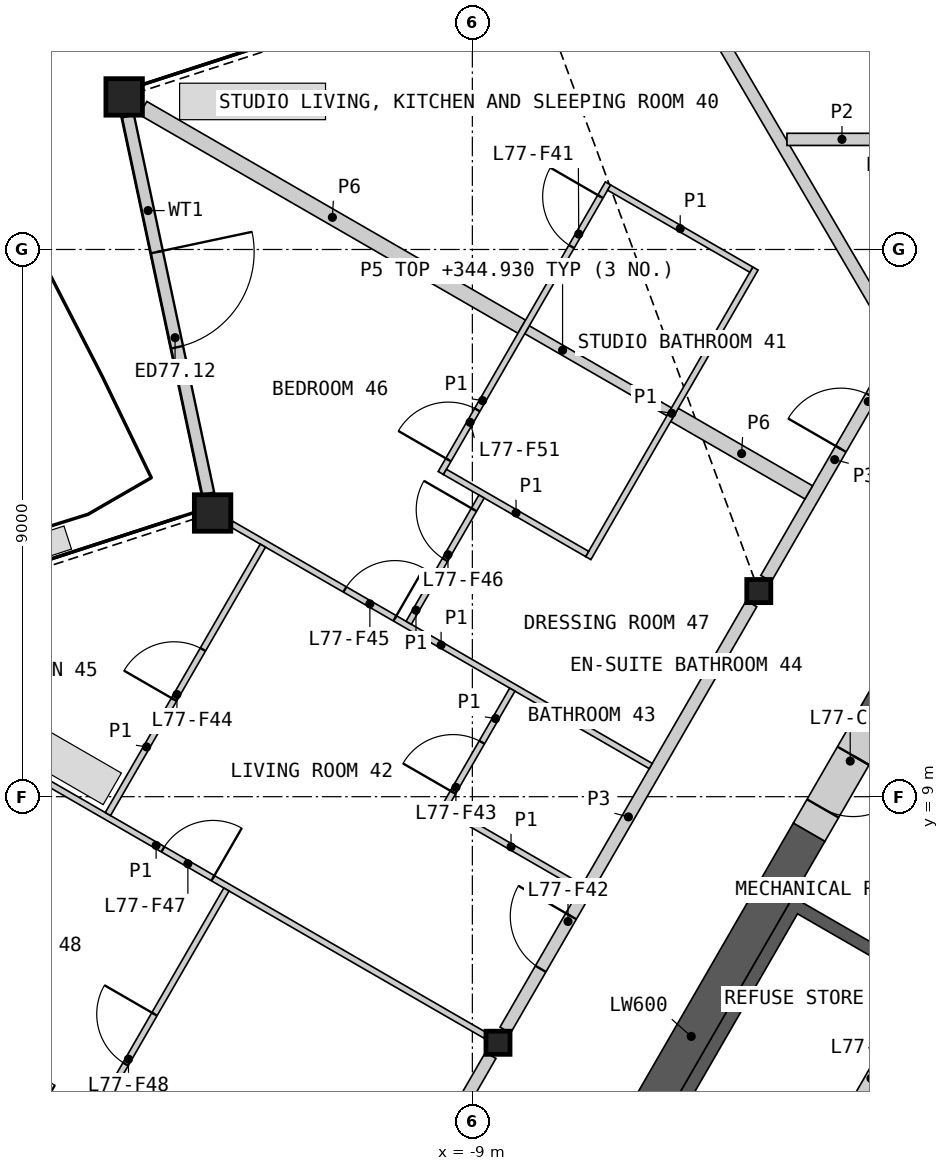
"""IFC4 building model, lengths in metres.
Left out: names, types, materials, properties, quantities, classifications, styles, units other than length and angle.
Written with IfcOpenShell. Run it as: python <this file> out.ifc"""

import sys

from ifc_helpers import new_model, si_unit, direction, frame, frame_2d, origin, origin_2d, place, context, subcontext, project, spatial, polyline, rectangle, hollow_rectangle, i_section, outline, extrude, element, fill, save


model = new_model("IFC4")
c1 = context("Model", 3, precision=1e-05, world=origin(), true_north=direction((0.0, 1.0)))
c2 = subcontext(c1, "Body", "Model", "MODEL_VIEW")
j1 = project(units=[si_unit("LENGTHUNIT", "METRE"), si_unit("PLANEANGLEUNIT", "RADIAN")], contexts=[c1])
p1 = place(None, origin())
s1 = spatial("IfcSite", under=j1, at=p1, CompositionType="ELEMENT")
p2 = place(p1, origin())
s2 = spatial("IfcBuilding", under=s1, at=p2, CompositionType="ELEMENT")
p3 = place(p2, frame((0.0, 0.0, 342.6)))
s3 = spatial("IfcBuildingStorey", under=s2, at=p3, CompositionType="ELEMENT", Elevation=342.6)
for number, where, z_axis, x_axis in (
    (1, (-14.727, 20.509, 0.0), (0.0, 0.0, 1.0), (1.0, 0.0, 0.0)),
    (2, (-13.272, 13.666, 0.0), (0.0, 0.0, 1.0), (1.0, 0.0, 0.0)),
):
    element("IfcColumn", number, at=place(p3, frame(where, z_axis=z_axis, x_axis=x_axis)), inside=s3, PredefinedType="COLUMN", context=c2, shape_type="SweptSolid", body=[
        extrude(hollow_rectangle(XDim=0.6, YDim=0.6, WallThickness=0.04, at=origin_2d()), origin(), (0.0, 0.0, 1.0), 3.4),
    ])
for number, where, z_axis, x_axis in (
    (3, (-4.289, 12.382, 0.0), (0.0, 0.0, 1.0), (1.0, 0.0, 0.0)),
    (4, (-8.578, 4.953, 0.0), (0.0, 0.0, 1.0), (1.0, 0.0, 0.0)),
):
    element("IfcColumn", number, at=place(p3, frame(where, z_axis=z_axis, x_axis=x_axis)), inside=s3, PredefinedType="COLUMN", context=c2, shape_type="SweptSolid", body=[
        extrude(i_section(OverallWidth=0.396, OverallDepth=0.381, WebThickness=0.019, FlangeThickness=0.03, at=origin_2d()), origin(), (0.0, 0.0, 1.0), 3.4),
    ])
p4 = place(p3, frame((-14.663, 20.192, 0.0), z_axis=(0.0, 0.0, 1.0), x_axis=(0.207897850695, -0.97815054244, 0.0)))
e5 = element("IfcWall", 5, at=p4, inside=s3, PredefinedType="SOLIDWALL", context=c2, shape_type="SweptSolid", body=[
    extrude(rectangle(XDim=6.348, YDim=0.2, at=frame_2d((3.174, 0.0))), origin(), (0.0, 0.0, 1.0), 2.488),
])
p5 = place(p4, frame((2.285, 0.0, 0.0)))
e6 = element("IfcOpeningElement", 6, at=p5, cuts=e5, PredefinedType="OPENING", context=c2, shape_type="SweptSolid", body=[
    extrude(rectangle(XDim=1.6, YDim=2.25, at=frame_2d((0.8, 1.125))), frame((0.0, 0.11, 0.0), z_axis=(0.0, -1.0, 0.0), x_axis=(1.0, 0.0, 0.0)), (0.0, 0.0, 1.0), 0.22),
])
p6 = place(p3, origin())
e7 = element("IfcWall", 7, at=p6, inside=s3, PredefinedType="SHEAR", context=c2, shape_type="SweptSolid", body=[
    extrude(outline(polyline([(-4.96, 0.208), (-7.131, 1.461), (-3.731, 7.35), (-1.561, 6.097), (-1.66, 5.924), (-3.652, 7.074), (-5.752, 3.437), (-3.76, 2.287), (-3.861, 2.113), (-5.852, 3.263), (-6.852, 1.531), (-4.861, 0.381), (-4.96, 0.208)])), origin(), (0.0, 0.0, 1.0), 3.1),
])
p7 = place(p3, frame((-1.631, 5.776, 0.0), z_axis=(0.0, 0.0, 1.0), x_axis=(-0.499992876559, -0.866029516466, 0.0)))
e8 = element("IfcWall", 8, at=p7, inside=s3, PredefinedType="SOLIDWALL", context=c2, shape_type="SweptSolid", body=[
    extrude(rectangle(XDim=6.486, YDim=0.2, at=frame_2d((3.243, 0.0))), origin(), (0.0, 0.0, 1.0), 3.1),
])
p8 = place(p7, frame((1.537, 0.0, 0.0)))
e9 = element("IfcOpeningElement", 9, at=p8, cuts=e8, PredefinedType="OPENING", context=c2, shape_type="SweptSolid", body=[
    extrude(rectangle(XDim=0.9, YDim=2.1, at=frame_2d((0.45, 1.05))), frame((0.0, 0.11, 0.0), z_axis=(0.0, -1.0, 0.0), x_axis=(1.0, 0.0, 0.0)), (0.0, 0.0, 1.0), 0.22),
])
p9 = place(p7, frame((4.837, 0.0, 0.0)))
e10 = element("IfcOpeningElement", 10, at=p9, cuts=e8, PredefinedType="OPENING", context=c2, shape_type="SweptSolid", body=[
    extrude(rectangle(XDim=0.9, YDim=2.1, at=frame_2d((0.45, 1.05))), frame((0.0, 0.11, 0.0), z_axis=(0.0, -1.0, 0.0), x_axis=(1.0, 0.0, 0.0)), (0.0, 0.0, 1.0), 0.22),
])
p10 = place(p3, frame((-3.461, 8.417, 0.0), z_axis=(0.0, 0.0, 1.0), x_axis=(-0.50000391502, -0.866023143435, 0.0)))
e11 = element("IfcWall", 11, at=p10, inside=s3, PredefinedType="SHEAR", context=c2, shape_type="SweptSolid", body=[
    extrude(rectangle(XDim=7.759, YDim=0.6, at=frame_2d((3.879, 0.0))), origin(), (0.0, 0.0, 1.0), 3.1),
])
p11 = place(p3, frame((-1.59, 11.658, 0.0), z_axis=(0.0, 0.0, 1.0), x_axis=(-0.500037594623, -0.866003697431, 0.0)))
e12 = element("IfcWall", 12, at=p11, inside=s3, PredefinedType="SHEAR", context=c2, shape_type="SweptSolid", body=[
    extrude(rectangle(XDim=1.542, YDim=0.6, at=frame_2d((0.771, 0.0))), origin(), (0.0, 0.0, 1.0), 3.1),
])
p12 = place(p3, frame((-2.361, 10.322, 0.0), z_axis=(0.0, 0.0, 1.0), x_axis=(-0.499946605688, -0.86605622881, 0.0)))
e13 = element("IfcWall", 13, at=p12, inside=s3, PredefinedType="SHEAR", context=c2, shape_type="SweptSolid", body=[
    extrude(rectangle(XDim=2.2, YDim=0.6, at=frame_2d((1.1, 0.0))), origin(), (0.0, 0.0, 1.0), 3.1),
])
p13 = place(p12, frame((0.75, 0.0, 0.0)))
e14 = element("IfcOpeningElement", 14, at=p13, cuts=e13, PredefinedType="OPENING", context=c2, shape_type="SweptSolid", body=[
    extrude(rectangle(XDim=1.0, YDim=2.1, at=frame_2d((0.5, 1.05))), frame((0.0, 0.31, 0.0), z_axis=(0.0, -1.0, 0.0), x_axis=(1.0, 0.0, 0.0)), (0.0, 0.0, 1.0), 0.62),
])
p14 = place(p3, frame((-8.458, 5.16, 0.0), z_axis=(0.0, 0.0, 1.0), x_axis=(0.499984266882, 0.866034487114, 0.0)))
e15 = element("IfcWall", 15, at=p14, inside=s3, PredefinedType="PARTITIONING", context=c2, shape_type="SweptSolid", body=[
    extrude(rectangle(XDim=8.099, YDim=0.2, at=frame_2d((4.049, 0.0))), origin(), (0.0, 0.0, 1.0), 3.1),
])
p15 = place(p14, frame((1.164, 0.0, 0.0)))
e16 = element("IfcOpeningElement", 16, at=p15, cuts=e15, PredefinedType="OPENING", context=c2, shape_type="SweptSolid", body=[
    extrude(rectangle(XDim=1.0, YDim=2.1, at=frame_2d((0.5, 1.05))), frame((0.0, 0.11, 0.0), z_axis=(0.0, -1.0, 0.0), x_axis=(1.0, 0.0, 0.0)), (0.0, 0.0, 1.0), 0.22),
])
p16 = place(p3, frame((-12.748, -2.269, 0.0), z_axis=(0.0, 0.0, 1.0), x_axis=(0.499984266882, 0.866034487114, 0.0)))
e17 = element("IfcWall", 17, at=p16, inside=s3, PredefinedType="PARTITIONING", context=c2, shape_type="SweptSolid", body=[
    extrude(rectangle(XDim=8.099, YDim=0.2, at=frame_2d((4.049, 0.0))), origin(), (0.0, 0.0, 1.0), 3.1),
])
p17 = place(p3, frame((-14.417, 20.327, 0.0), z_axis=(0.0, 0.0, 1.0), x_axis=(0.866018271907, -0.50001235257, 0.0)))
e18 = element("IfcWall", 18, at=p17, inside=s3, PredefinedType="PARTITIONING", context=c2, shape_type="SweptSolid", body=[
    extrude(rectangle(XDim=7.193, YDim=0.25, at=frame_2d((3.596, 0.0))), origin(), (0.0, 0.0, 1.0), 2.33),
])
p18 = place(p3, frame((-4.169, 12.59, 0.0), z_axis=(0.0, 0.0, 1.0), x_axis=(0.499950370306, 0.866054055606, 0.0)))
e19 = element("IfcWall", 19, at=p18, inside=s3, PredefinedType="PARTITIONING", context=c2, shape_type="SweptSolid", body=[
    extrude(rectangle(XDim=4.513, YDim=0.2, at=frame_2d((2.256, 0.0))), origin(), (0.0, 0.0, 1.0), 3.1),
])
p19 = place(p18, frame((2.459, 0.0, 0.0)))
e20 = element("IfcOpeningElement", 20, at=p19, cuts=e19, PredefinedType="OPENING", context=c2, shape_type="SweptSolid", body=[
    extrude(rectangle(XDim=1.0, YDim=2.1, at=frame_2d((0.5, 1.05))), frame((0.0, 0.11, 0.0), z_axis=(0.0, -1.0, 0.0), x_axis=(1.0, 0.0, 0.0)), (0.0, 0.0, 1.0), 0.22),
])
p20 = place(p3, frame((-5.676, 15.28, 0.0), z_axis=(0.0, 0.0, 1.0), x_axis=(0.865989465428, -0.500062241894, 0.0)))
e21 = element("IfcWall", 21, at=p20, inside=s3, PredefinedType="PARTITIONING", context=c2, shape_type="SweptSolid", body=[
    extrude(rectangle(XDim=2.55, YDim=0.25, at=frame_2d((1.275, 0.0))), origin(), (0.0, 0.0, 1.0), 2.33),
])
p21 = place(p3, frame((-9.292, 28.919, 0.0), z_axis=(0.0, 0.0, 1.0), x_axis=(0.505558038556, -0.862792599442, 0.0)))
e22 = element("IfcWall", 22, at=p21, inside=s3, PredefinedType="PARTITIONING", context=c2, shape_type="SweptSolid", body=[
    extrude(rectangle(XDim=14.397, YDim=0.2, at=frame_2d((7.199, 0.0))), origin(), (0.0, 0.0, 1.0), 2.33),
])
p22 = place(p3, frame((-3.826, 19.811, 0.0), z_axis=(0.0, 0.0, 1.0), x_axis=(1.0, 0.0, 0.0)))
e23 = element("IfcWall", 23, at=p22, inside=s3, PredefinedType="PARTITIONING", context=c2, shape_type="SweptSolid", body=[
    extrude(rectangle(XDim=3.618, YDim=0.2, at=frame_2d((1.809, 0.0))), origin(), (0.0, 0.0, 1.0), 2.33),
])
p23 = place(p22, frame((1.489, 0.0, 0.0)))
e24 = element("IfcOpeningElement", 24, at=p23, cuts=e23, PredefinedType="OPENING", context=c2, shape_type="SweptSolid", body=[
    extrude(rectangle(XDim=0.95, YDim=2.1, at=frame_2d((0.475, 1.05))), frame((0.0, 0.11, 0.0), z_axis=(0.0, -1.0, 0.0), x_axis=(1.0, 0.0, 0.0)), (0.0, 0.0, 1.0), 0.22),
])
p24 = place(p3, frame((-8.101, 16.68, 0.0), z_axis=(0.0, 0.0, 1.0), x_axis=(0.866019956843, -0.50000943426, 0.0)))
e25 = element("IfcWall", 25, at=p24, inside=s3, PredefinedType="PLUMBINGWALL", context=c2, shape_type="SweptSolid", body=[
    extrude(rectangle(XDim=2.7, YDim=0.15, at=frame_2d((1.35, 0.0))), origin(), (0.0, 0.0, 1.0), 2.33),
])
p25 = place(p3, frame((-19.615, 11.325, 0.0), z_axis=(0.0, 0.0, 1.0), x_axis=(0.86602139559, -0.500006942333, 0.0)))
e26 = element("IfcWall", 26, at=p25, inside=s3, PredefinedType="PARTITIONING", context=c2, shape_type="SweptSolid", body=[
    extrude(rectangle(XDim=12.505, YDim=0.1, at=frame_2d((6.252, 0.0))), origin(), (0.0, 0.0, 1.0), 2.33),
])
p26 = place(p25, frame((6.38, 0.0, 0.0)))
e27 = element("IfcOpeningElement", 27, at=p26, cuts=e26, PredefinedType="OPENING", context=c2, shape_type="SweptSolid", body=[
    extrude(rectangle(XDim=0.95, YDim=2.1, at=frame_2d((0.475, 1.05))), frame((0.0, 0.06, 0.0), z_axis=(0.0, -1.0, 0.0), x_axis=(1.0, 0.0, 0.0)), (0.0, 0.0, 1.0), 0.12),
])
p27 = place(p3, frame((-18.154, -1.377, 0.0), z_axis=(0.0, 0.0, 1.0), x_axis=(0.49998782916, 0.866032430508, 0.0)))
e28 = element("IfcWall", 28, at=p27, inside=s3, PredefinedType="PARTITIONING", context=c2, shape_type="SweptSolid", body=[
    extrude(rectangle(XDim=10.22, YDim=0.1, at=frame_2d((5.11, 0.0))), origin(), (0.0, 0.0, 1.0), 2.33),
])
p28 = place(p27, frame((6.903, 0.0, 0.0)))
e29 = element("IfcOpeningElement", 29, at=p28, cuts=e28, PredefinedType="OPENING", context=c2, shape_type="SweptSolid", body=[
    extrude(rectangle(XDim=0.95, YDim=2.1, at=frame_2d((0.475, 1.05))), frame((0.0, 0.06, 0.0), z_axis=(0.0, -1.0, 0.0), x_axis=(1.0, 0.0, 0.0)), (0.0, 0.0, 1.0), 0.12),
])
p29 = place(p27, frame((0.552, 0.0, 0.0)))
e30 = element("IfcOpeningElement", 30, at=p29, cuts=e28, PredefinedType="OPENING", context=c2, shape_type="SweptSolid", body=[
    extrude(rectangle(XDim=0.95, YDim=2.1, at=frame_2d((0.475, 1.05))), frame((0.0, 0.06, 0.0), z_axis=(0.0, -1.0, 0.0), x_axis=(1.0, 0.0, 0.0)), (0.0, 0.0, 1.0), 0.12),
])
p30 = place(p3, frame((-18.161, 4.484, 0.0), z_axis=(0.0, 0.0, 1.0), x_axis=(0.86602732995, -0.499996663769, 0.0)))
e31 = element("IfcWall", 31, at=p30, inside=s3, PredefinedType="PARTITIONING", context=c2, shape_type="SweptSolid", body=[
    extrude(rectangle(XDim=7.964, YDim=0.1, at=frame_2d((3.982, 0.0))), origin(), (0.0, 0.0, 1.0), 2.33),
])
p31 = place(p30, frame((1.152, 0.0, 0.0)))
e32 = element("IfcOpeningElement", 32, at=p31, cuts=e31, PredefinedType="OPENING", context=c2, shape_type="SweptSolid", body=[
    extrude(rectangle(XDim=0.95, YDim=2.1, at=frame_2d((0.475, 1.05))), frame((0.0, 0.06, 0.0), z_axis=(0.0, -1.0, 0.0), x_axis=(1.0, 0.0, 0.0)), (0.0, 0.0, 1.0), 0.12),
])
p32 = place(p3, frame((-12.962, 13.485, 0.0), z_axis=(0.0, 0.0, 1.0), x_axis=(0.866021168401, -0.500007335828, 0.0)))
e33 = element("IfcWall", 33, at=p32, inside=s3, PredefinedType="PARTITIONING", context=c2, shape_type="SweptSolid", body=[
    extrude(rectangle(XDim=7.962, YDim=0.1, at=frame_2d((3.981, 0.0))), origin(), (0.0, 0.0, 1.0), 2.33),
])
p33 = place(p32, frame((2.154, 0.0, 0.0)))
e34 = element("IfcOpeningElement", 34, at=p33, cuts=e33, PredefinedType="OPENING", context=c2, shape_type="SweptSolid", body=[
    extrude(rectangle(XDim=0.95, YDim=2.1, at=frame_2d((0.475, 1.05))), frame((0.0, 0.06, 0.0), z_axis=(0.0, -1.0, 0.0), x_axis=(1.0, 0.0, 0.0)), (0.0, 0.0, 1.0), 0.12),
])
p34 = place(p3, frame((-7.094, 12.924, 0.0), z_axis=(0.0, 0.0, 1.0), x_axis=(0.499996545922, 0.866027397988, 0.0)))
e35 = element("IfcWall", 35, at=p34, inside=s3, PredefinedType="PARTITIONING", context=c2, shape_type="SweptSolid", body=[
    extrude(rectangle(XDim=5.5, YDim=0.1, at=frame_2d((2.75, 0.0))), origin(), (0.0, 0.0, 1.0), 2.33),
])
p35 = place(p3, frame((-9.519, 14.323, 0.0), z_axis=(0.0, 0.0, 1.0), x_axis=(0.499996545922, 0.866027397988, 0.0)))
e36 = element("IfcWall", 36, at=p35, inside=s3, PredefinedType="PARTITIONING", context=c2, shape_type="SweptSolid", body=[
    extrude(rectangle(XDim=5.5, YDim=0.1, at=frame_2d((2.75, 0.0))), origin(), (0.0, 0.0, 1.0), 2.33),
])
p36 = place(p35, frame((4.3, 0.0, 0.0)))
e37 = element("IfcOpeningElement", 37, at=p36, cuts=e36, PredefinedType="OPENING", context=c2, shape_type="SweptSolid", body=[
    extrude(rectangle(XDim=0.95, YDim=2.1, at=frame_2d((0.475, 1.05))), frame((0.0, 0.06, 0.0), z_axis=(0.0, -1.0, 0.0), x_axis=(1.0, 0.0, 0.0)), (0.0, 0.0, 1.0), 0.12),
])
p37 = place(p35, frame((0.25, 0.0, 0.0)))
e38 = element("IfcOpeningElement", 38, at=p37, cuts=e36, PredefinedType="OPENING", context=c2, shape_type="SweptSolid", body=[
    extrude(rectangle(XDim=0.95, YDim=2.1, at=frame_2d((0.475, 1.05))), frame((0.0, 0.06, 0.0), z_axis=(0.0, -1.0, 0.0), x_axis=(1.0, 0.0, 0.0)), (0.0, 0.0, 1.0), 0.12),
])
p38 = place(p3, frame((-14.994, 8.714, 0.0), z_axis=(0.0, 0.0, 1.0), x_axis=(0.500012659481, 0.866018094706, 0.0)))
e39 = element("IfcWall", 39, at=p38, inside=s3, PredefinedType="PARTITIONING", context=c2, shape_type="SweptSolid", body=[
    extrude(rectangle(XDim=5.097, YDim=0.1, at=frame_2d((2.549, 0.0))), origin(), (0.0, 0.0, 1.0), 2.33),
])
p39 = place(p38, frame((2.175, 0.0, 0.0)))
e40 = element("IfcOpeningElement", 40, at=p39, cuts=e39, PredefinedType="OPENING", context=c2, shape_type="SweptSolid", body=[
    extrude(rectangle(XDim=0.95, YDim=2.1, at=frame_2d((0.475, 1.05))), frame((0.0, 0.06, 0.0), z_axis=(0.0, -1.0, 0.0), x_axis=(1.0, 0.0, 0.0)), (0.0, 0.0, 1.0), 0.12),
])
for number, where, z_axis, x_axis in (
    (41, (-9.451, 14.342, 0.0), (0.0, 0.0, 1.0), (0.866, -0.5, 0.0)),
    (42, (-6.751, 19.018, 0.0), (0.0, 0.0, 1.0), (0.866, -0.5, 0.0)),
):
    element("IfcWall", number, at=place(p3, frame(where, z_axis=z_axis, x_axis=x_axis)), inside=s3, PredefinedType="PARTITIONING", context=c2, shape_type="SweptSolid", body=[
        extrude(rectangle(XDim=2.7, YDim=0.1, at=frame_2d((1.35, 0.0))), origin(), (0.0, 0.0, 1.0), 2.33),
    ])
p40 = place(p3, frame((-9.511, 8.837, 0.0), z_axis=(0.0, 0.0, 1.0), x_axis=(0.866029095148, -0.499993606316, 0.0)))
e43 = element("IfcWall", 43, at=p40, inside=s3, PredefinedType="PARTITIONING", context=c2, shape_type="SweptSolid", body=[
    extrude(rectangle(XDim=2.65, YDim=0.1, at=frame_2d((1.325, 0.0))), origin(), (0.0, 0.0, 1.0), 2.33),
])
p41 = place(p3, frame((-10.047, 11.86, 0.0), z_axis=(0.0, 0.0, 1.0), x_axis=(0.500092661743, 0.865971898892, 0.0)))
e44 = element("IfcWall", 44, at=p41, inside=s3, PredefinedType="PARTITIONING", context=c2, shape_type="SweptSolid", body=[
    extrude(rectangle(XDim=2.397, YDim=0.1, at=frame_2d((1.199, 0.0))), origin(), (0.0, 0.0, 1.0), 2.33),
])
p42 = place(p41, frame((1.198, 0.0, 0.0)))
e45 = element("IfcOpeningElement", 45, at=p42, cuts=e44, PredefinedType="OPENING", context=c2, shape_type="SweptSolid", body=[
    extrude(rectangle(XDim=0.95, YDim=2.1, at=frame_2d((0.475, 1.05))), frame((0.0, 0.06, 0.0), z_axis=(0.0, -1.0, 0.0), x_axis=(1.0, 0.0, 0.0)), (0.0, 0.0, 1.0), 0.12),
])
p43 = place(p3, frame((-9.443, 8.855, 0.0), z_axis=(0.0, 0.0, 1.0), x_axis=(0.50002983664, 0.866008176907, 0.0)))
e46 = element("IfcWall", 46, at=p43, inside=s3, PredefinedType="PARTITIONING", context=c2, shape_type="SweptSolid", body=[
    extrude(rectangle(XDim=2.2, YDim=0.1, at=frame_2d((1.1, 0.0))), origin(), (0.0, 0.0, 1.0), 2.33),
])
p44 = place(p43, frame((0.25, 0.0, 0.0)))
e47 = element("IfcOpeningElement", 47, at=p44, cuts=e46, PredefinedType="OPENING", context=c2, shape_type="SweptSolid", body=[
    extrude(rectangle(XDim=0.95, YDim=2.1, at=frame_2d((0.475, 1.05))), frame((0.0, 0.06, 0.0), z_axis=(0.0, -1.0, 0.0), x_axis=(1.0, 0.0, 0.0)), (0.0, 0.0, 1.0), 0.12),
])
p45 = place(p5, origin())
e48 = element("IfcDoor", 48, at=p45, inside=s3, OperationType="DOUBLE_DOOR_SINGLE_SWING", PredefinedType="DOOR", context=c2, shape_type="SweptSolid", body=[
    extrude(rectangle(XDim=1.6, YDim=2.25, at=frame_2d((0.8, 1.125))), frame((0.0, 0.025, 0.0), z_axis=(0.0, -1.0, 0.0), x_axis=(1.0, 0.0, 0.0)), (0.0, 0.0, 1.0), 0.05),
])
fill(e6, e48)
p46 = place(p8, origin())
e49 = element("IfcDoor", 49, at=p46, inside=s3, OperationType="SINGLE_SWING_LEFT", PredefinedType="DOOR", context=c2, shape_type="SweptSolid", body=[
    extrude(rectangle(XDim=0.9, YDim=2.1, at=frame_2d((0.45, 1.05))), frame((0.0, 0.025, 0.0), z_axis=(0.0, -1.0, 0.0), x_axis=(1.0, 0.0, 0.0)), (0.0, 0.0, 1.0), 0.05),
])
fill(e9, e49)
p47 = place(p13, origin())
e50 = element("IfcDoor", 50, at=p47, inside=s3, OperationType="SINGLE_SWING_LEFT", PredefinedType="DOOR", context=c2, shape_type="SweptSolid", body=[
    extrude(rectangle(XDim=1.0, YDim=2.1, at=frame_2d((0.5, 1.05))), frame((0.0, 0.055, 0.0), z_axis=(0.0, -1.0, 0.0), x_axis=(1.0, 0.0, 0.0)), (0.0, 0.0, 1.0), 0.05),
])
fill(e14, e50)
p48 = place(p19, origin())
e51 = element("IfcDoor", 51, at=p48, inside=s3, OperationType="SINGLE_SWING_LEFT", PredefinedType="DOOR", context=c2, shape_type="SweptSolid", body=[
    extrude(rectangle(XDim=1.0, YDim=2.1, at=frame_2d((0.5, 1.05))), frame((0.0, 0.025, 0.0), z_axis=(0.0, -1.0, 0.0), x_axis=(1.0, 0.0, 0.0)), (0.0, 0.0, 1.0), 0.05),
])
fill(e20, e51)
p49 = place(p36, origin())
e52 = element("IfcDoor", 52, at=p49, inside=s3, OperationType="SINGLE_SWING_RIGHT", PredefinedType="DOOR", context=c2, shape_type="SweptSolid", body=[
    extrude(rectangle(XDim=0.95, YDim=2.1, at=frame_2d((0.475, 1.05))), frame((0.0, 0.025, 0.0), z_axis=(0.0, -1.0, 0.0), x_axis=(1.0, 0.0, 0.0)), (0.0, 0.0, 1.0), 0.05),
])
fill(e37, e52)
p50 = place(p15, origin())
e53 = element("IfcDoor", 53, at=p50, inside=s3, OperationType="SINGLE_SWING_RIGHT", PredefinedType="DOOR", context=c2, shape_type="SweptSolid", body=[
    extrude(rectangle(XDim=1.0, YDim=2.1, at=frame_2d((0.5, 1.05))), frame((0.0, 0.025, 0.0), z_axis=(0.0, -1.0, 0.0), x_axis=(1.0, 0.0, 0.0)), (0.0, 0.0, 1.0), 0.05),
])
fill(e16, e53)
p51 = place(p44, origin())
e54 = element("IfcDoor", 54, at=p51, inside=s3, OperationType="SINGLE_SWING_LEFT", PredefinedType="DOOR", context=c2, shape_type="SweptSolid", body=[
    extrude(rectangle(XDim=0.95, YDim=2.1, at=frame_2d((0.475, 1.05))), frame((0.0, 0.025, 0.0), z_axis=(0.0, -1.0, 0.0), x_axis=(1.0, 0.0, 0.0)), (0.0, 0.0, 1.0), 0.05),
])
fill(e47, e54)
p52 = place(p39, origin())
e55 = element("IfcDoor", 55, at=p52, inside=s3, OperationType="SINGLE_SWING_LEFT", PredefinedType="DOOR", context=c2, shape_type="SweptSolid", body=[
    extrude(rectangle(XDim=0.95, YDim=2.1, at=frame_2d((0.475, 1.05))), frame((0.0, 0.025, 0.0), z_axis=(0.0, -1.0, 0.0), x_axis=(1.0, 0.0, 0.0)), (0.0, 0.0, 1.0), 0.05),
])
fill(e40, e55)
p53 = place(p33, origin())
e56 = element("IfcDoor", 56, at=p53, inside=s3, OperationType="SINGLE_SWING_RIGHT", PredefinedType="DOOR", context=c2, shape_type="SweptSolid", body=[
    extrude(rectangle(XDim=0.95, YDim=2.1, at=frame_2d((0.475, 1.05))), frame((0.0, 0.025, 0.0), z_axis=(0.0, -1.0, 0.0), x_axis=(1.0, 0.0, 0.0)), (0.0, 0.0, 1.0), 0.05),
])
fill(e34, e56)
p54 = place(p42, origin())
e57 = element("IfcDoor", 57, at=p54, inside=s3, OperationType="SINGLE_SWING_RIGHT", PredefinedType="DOOR", context=c2, shape_type="SweptSolid", body=[
    extrude(rectangle(XDim=0.95, YDim=2.1, at=frame_2d((0.475, 1.05))), frame((0.0, 0.025, 0.0), z_axis=(0.0, -1.0, 0.0), x_axis=(1.0, 0.0, 0.0)), (0.0, 0.0, 1.0), 0.05),
])
fill(e45, e57)
p55 = place(p26, origin())
e58 = element("IfcDoor", 58, at=p55, inside=s3, OperationType="SINGLE_SWING_RIGHT", PredefinedType="DOOR", context=c2, shape_type="SweptSolid", body=[
    extrude(rectangle(XDim=0.95, YDim=2.1, at=frame_2d((0.475, 1.05))), frame((0.0, 0.025, 0.0), z_axis=(0.0, -1.0, 0.0), x_axis=(1.0, 0.0, 0.0)), (0.0, 0.0, 1.0), 0.05),
])
fill(e27, e58)
p56 = place(p28, origin())
e59 = element("IfcDoor", 59, at=p56, inside=s3, OperationType="SINGLE_SWING_RIGHT", PredefinedType="DOOR", context=c2, shape_type="SweptSolid", body=[
    extrude(rectangle(XDim=0.95, YDim=2.1, at=frame_2d((0.475, 1.05))), frame((0.0, 0.025, 0.0), z_axis=(0.0, -1.0, 0.0), x_axis=(1.0, 0.0, 0.0)), (0.0, 0.0, 1.0), 0.05),
])
fill(e29, e59)
p57 = place(p37, origin())
e60 = element("IfcDoor", 60, at=p57, inside=s3, OperationType="SINGLE_SWING_LEFT", PredefinedType="DOOR", context=c2, shape_type="SweptSolid", body=[
    extrude(rectangle(XDim=0.95, YDim=2.1, at=frame_2d((0.475, 1.05))), frame((0.0, 0.025, 0.0), z_axis=(0.0, -1.0, 0.0), x_axis=(1.0, 0.0, 0.0)), (0.0, 0.0, 1.0), 0.05),
])
fill(e38, e60)
save(model, sys.argv[1])
